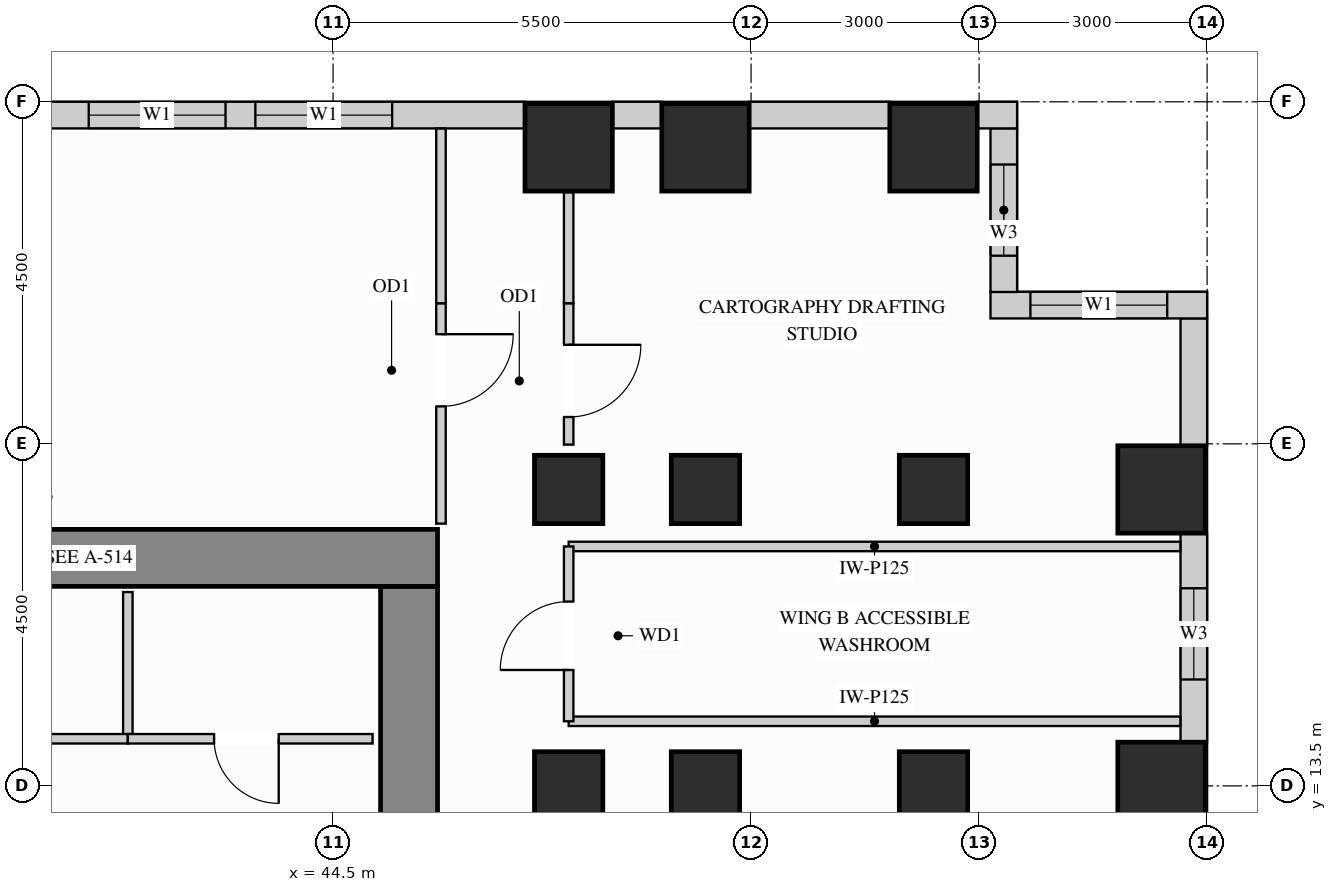
"""IFC4 building model, lengths in metres.
Left out: names, types, materials, properties, quantities, classifications, styles, units other than length and angle.
Written with IfcOpenShell. Run it as: python <this file> out.ifc"""

import sys

from ifc_helpers import new_model, si_unit, direction, frame, frame_2d, origin, origin_2d, place, context, subcontext, project, spatial, rectangle, extrude, source, transform, mapped, element, fill, save


model = new_model("IFC4")
c1 = context("Model", 3, precision=1e-05, world=origin(), true_north=direction((0.0, 1.0)))
c2 = subcontext(c1, "Body", "Model", "MODEL_VIEW")
j1 = project(units=[si_unit("LENGTHUNIT", "METRE"), si_unit("PLANEANGLEUNIT", "RADIAN")], contexts=[c1])
p1 = place(None, origin())
s1 = spatial("IfcSite", under=j1, at=p1, CompositionType="ELEMENT")
p2 = place(p1, origin())
s2 = spatial("IfcBuilding", under=s1, at=p2, CompositionType="ELEMENT")
p3 = place(p2, frame((0.0, 0.0, 109.8)))
s3 = spatial("IfcBuildingStorey", under=s2, at=p3, CompositionType="ELEMENT", Elevation=109.8)
m1 = source(origin(), c2, "Body", "SweptSolid", [
    extrude(rectangle(XDim=0.9, YDim=0.9, at=origin_2d()), origin(), (0.0, 0.0, 1.0), 3.38),
])
for number, where, z_axis, x_axis in (
    (1, (47.6, 13.5, 0.0), (0.0, 0.0, 1.0), (1.0, 0.0, 0.0)),
    (2, (47.6, 17.4, 0.0), (0.0, 0.0, 1.0), (1.0, 0.0, 0.0)),
    (3, (49.4, 13.5, 0.0), (0.0, 0.0, 1.0), (1.0, 0.0, 0.0)),
    (4, (49.4, 17.4, 0.0), (0.0, 0.0, 1.0), (1.0, 0.0, 0.0)),
    (5, (52.4, 13.5, 0.0), (0.0, 0.0, 1.0), (1.0, 0.0, 0.0)),
    (6, (52.4, 17.4, 0.0), (0.0, 0.0, 1.0), (1.0, 0.0, 0.0)),
):
    element("IfcColumn", number, at=place(p3, frame(where, z_axis=z_axis, x_axis=x_axis)), inside=s3, PredefinedType="COLUMN", context=c2, shape_type="MappedRepresentation", body=[
        mapped(m1, transform((0.0, 0.0, 0.0), x_axis=(1.0, 0.0, 0.0), y_axis=(0.0, 1.0, 0.0), z_axis=(0.0, 0.0, 1.0))),
    ])
m2 = source(origin(), c2, "Body", "SweptSolid", [
    extrude(rectangle(XDim=1.15, YDim=1.15, at=origin_2d()), origin(), (0.0, 0.0, 1.0), 3.38),
])
for number, where, z_axis, x_axis in (
    (7, (47.6, 21.9, 0.0), (0.0, 0.0, 1.0), (1.0, 0.0, 0.0)),
    (8, (49.4, 21.9, 0.0), (0.0, 0.0, 1.0), (1.0, 0.0, 0.0)),
    (9, (52.4, 21.9, 0.0), (0.0, 0.0, 1.0), (1.0, 0.0, 0.0)),
    (10, (55.4, 13.5, 0.0), (0.0, 0.0, 1.0), (1.0, 0.0, 0.0)),
    (11, (55.4, 17.4, 0.0), (0.0, 0.0, 1.0), (1.0, 0.0, 0.0)),
):
    element("IfcColumn", number, at=place(p3, frame(where, z_axis=z_axis, x_axis=x_axis)), inside=s3, PredefinedType="COLUMN", context=c2, shape_type="MappedRepresentation", body=[
        mapped(m2, transform((0.0, 0.0, 0.0), x_axis=(1.0, 0.0, 0.0), y_axis=(0.0, 1.0, 0.0), z_axis=(0.0, 0.0, 1.0))),
    ])
m3 = source(origin(), c2, "Body", "SweptSolid", [
    extrude(rectangle(XDim=3.725, YDim=0.75, at=frame_2d((1.863, 0.0))), origin(), (0.0, 0.0, 1.0), 3.38),
])
p4 = place(p3, frame((45.5, 12.4, 0.0), z_axis=(0.0, 0.0, 1.0), x_axis=(0.0, 1.0, 0.0)))
e12 = element("IfcWall", 12, at=p4, inside=s3, PredefinedType="SHEAR", context=c2, shape_type="MappedRepresentation", body=[
    mapped(m3, transform((0.0, 0.0, 0.0), x_axis=(1.0, 0.0, 0.0), y_axis=(0.0, 1.0, 0.0), z_axis=(0.0, 0.0, 1.0))),
])
m4 = source(origin(), c2, "Body", "SweptSolid", [
    extrude(rectangle(XDim=10.25, YDim=0.75, at=frame_2d((5.125, 0.0))), origin(), (0.0, 0.0, 1.0), 3.38),
])
p5 = place(p3, frame((35.625, 16.5, 0.0), z_axis=(0.0, 0.0, 1.0), x_axis=(1.0, 0.0, 0.0)))
e13 = element("IfcWall", 13, at=p5, inside=s3, PredefinedType="SHEAR", context=c2, shape_type="MappedRepresentation", body=[
    mapped(m4, transform((0.0, 0.0, 0.0), x_axis=(1.0, 0.0, 0.0), y_axis=(0.0, 1.0, 0.0), z_axis=(0.0, 0.0, 1.0))),
])
p6 = place(p3, frame((55.825, 14.073, 0.0), z_axis=(0.0, 0.0, 1.0), x_axis=(0.0, 1.0, 0.0)))
e14 = element("IfcWall", 14, at=p6, inside=s3, PredefinedType="SOLIDWALL", context=c2, shape_type="SweptSolid", body=[
    extrude(rectangle(XDim=2.754, YDim=0.35, at=frame_2d((1.377, 0.0))), origin(), (0.0, 0.0, 1.0), 3.365),
])
p7 = place(p6, frame((0.827, 0.0, 0.78)))
e15 = element("IfcOpeningElement", 15, at=p7, cuts=e14, PredefinedType="OPENING", context=c2, shape_type="SweptSolid", body=[
    extrude(rectangle(XDim=1.2, YDim=2.1, at=frame_2d((0.6, 1.05))), frame((0.0, 0.185, 0.0), z_axis=(0.0, -1.0, 0.0), x_axis=(1.0, 0.0, 0.0)), (0.0, 0.0, 1.0), 0.37),
])
m5 = source(origin(), c2, "Body", "SweptSolid", [
    extrude(rectangle(XDim=1.679, YDim=0.35, at=frame_2d((0.84, 0.0))), origin(), (0.0, 0.0, 1.0), 3.365),
])
p8 = place(p3, frame((55.825, 17.973, 0.0), z_axis=(0.0, 0.0, 1.0), x_axis=(0.0, 1.0, 0.0)))
e16 = element("IfcWall", 16, at=p8, inside=s3, PredefinedType="SOLIDWALL", context=c2, shape_type="MappedRepresentation", body=[
    mapped(m5, transform((0.0, 0.0, 0.0), x_axis=(1.0, 0.0, 0.0), y_axis=(0.0, 1.0, 0.0), z_axis=(0.0, 0.0, 1.0))),
])
p9 = place(p3, frame((56.0, 19.825, 0.0), z_axis=(0.0, 0.0, 1.0), x_axis=(-1.0, 0.0, 0.0)))
e17 = element("IfcWall", 17, at=p9, inside=s3, PredefinedType="SOLIDWALL", context=c2, shape_type="SweptSolid", body=[
    extrude(rectangle(XDim=2.85, YDim=0.35, at=frame_2d((1.425, 0.0))), origin(), (0.0, 0.0, 1.0), 3.365),
])
p10 = place(p9, frame((0.525, 0.0, 0.78)))
e18 = element("IfcOpeningElement", 18, at=p10, cuts=e17, PredefinedType="OPENING", context=c2, shape_type="SweptSolid", body=[
    extrude(rectangle(XDim=1.8, YDim=2.1, at=frame_2d((0.9, 1.05))), frame((0.0, 0.185, 0.0), z_axis=(0.0, -1.0, 0.0), x_axis=(1.0, 0.0, 0.0)), (0.0, 0.0, 1.0), 0.37),
])
p11 = place(p3, frame((53.325, 19.998, 0.0), z_axis=(0.0, 0.0, 1.0), x_axis=(0.0, 1.0, 0.0)))
e19 = element("IfcWall", 19, at=p11, inside=s3, PredefinedType="SOLIDWALL", context=c2, shape_type="SweptSolid", body=[
    extrude(rectangle(XDim=2.154, YDim=0.35, at=frame_2d((1.077, 0.0))), origin(), (0.0, 0.0, 1.0), 3.365),
])
p12 = place(p11, frame((0.477, 0.0, 0.78)))
e20 = element("IfcOpeningElement", 20, at=p12, cuts=e19, PredefinedType="OPENING", context=c2, shape_type="SweptSolid", body=[
    extrude(rectangle(XDim=1.2, YDim=2.1, at=frame_2d((0.6, 1.05))), frame((0.0, 0.185, 0.0), z_axis=(0.0, -1.0, 0.0), x_axis=(1.0, 0.0, 0.0)), (0.0, 0.0, 1.0), 0.37),
])
m6 = source(origin(), c2, "Body", "SweptSolid", [
    extrude(rectangle(XDim=0.527, YDim=0.35, at=frame_2d((0.264, 0.0))), origin(), (0.0, 0.0, 1.0), 3.365),
])
p13 = place(p3, frame((53.5, 22.325, 0.0), z_axis=(0.0, 0.0, 1.0), x_axis=(-1.0, 0.0, 0.0)))
e21 = element("IfcWall", 21, at=p13, inside=s3, PredefinedType="SOLIDWALL", context=c2, shape_type="MappedRepresentation", body=[
    mapped(m6, transform((0.0, 0.0, 0.0), x_axis=(1.0, 0.0, 0.0), y_axis=(0.0, 1.0, 0.0), z_axis=(0.0, 0.0, 1.0))),
])
m7 = source(origin(), c2, "Body", "SweptSolid", [
    extrude(rectangle(XDim=1.854, YDim=0.35, at=frame_2d((0.927, 0.0))), origin(), (0.0, 0.0, 1.0), 3.365),
])
p14 = place(p3, frame((51.827, 22.325, 0.0), z_axis=(0.0, 0.0, 1.0), x_axis=(-1.0, 0.0, 0.0)))
e22 = element("IfcWall", 22, at=p14, inside=s3, PredefinedType="SOLIDWALL", context=c2, shape_type="MappedRepresentation", body=[
    mapped(m7, transform((0.0, 0.0, 0.0), x_axis=(1.0, 0.0, 0.0), y_axis=(0.0, 1.0, 0.0), z_axis=(0.0, 0.0, 1.0))),
])
m8 = source(origin(), c2, "Body", "SweptSolid", [
    extrude(rectangle(XDim=0.654, YDim=0.35, at=frame_2d((0.327, 0.0))), origin(), (0.0, 0.0, 1.0), 3.365),
])
p15 = place(p3, frame((48.827, 22.325, 0.0), z_axis=(0.0, 0.0, 1.0), x_axis=(-1.0, 0.0, 0.0)))
e23 = element("IfcWall", 23, at=p15, inside=s3, PredefinedType="SOLIDWALL", context=c2, shape_type="MappedRepresentation", body=[
    mapped(m8, transform((0.0, 0.0, 0.0), x_axis=(1.0, 0.0, 0.0), y_axis=(0.0, 1.0, 0.0), z_axis=(0.0, 0.0, 1.0))),
])
p16 = place(p3, frame((47.027, 22.325, 0.0), z_axis=(0.0, 0.0, 1.0), x_axis=(-1.0, 0.0, 0.0)))
e24 = element("IfcWall", 24, at=p16, inside=s3, PredefinedType="SOLIDWALL", context=c2, shape_type="SweptSolid", body=[
    extrude(rectangle(XDim=6.454, YDim=0.35, at=frame_2d((3.227, 0.0))), origin(), (0.0, 0.0, 1.0), 3.365),
])
p17 = place(p16, frame((1.749, 0.0, 0.78)))
e25 = element("IfcOpeningElement", 25, at=p17, cuts=e24, PredefinedType="OPENING", context=c2, shape_type="SweptSolid", body=[
    extrude(rectangle(XDim=1.8, YDim=2.1, at=frame_2d((0.9, 1.05))), frame((0.0, 0.185, 0.0), z_axis=(0.0, -1.0, 0.0), x_axis=(1.0, 0.0, 0.0)), (0.0, 0.0, 1.0), 0.37),
])
p18 = place(p16, frame((3.942, 0.0, 0.78)))
e26 = element("IfcOpeningElement", 26, at=p18, cuts=e24, PredefinedType="OPENING", context=c2, shape_type="SweptSolid", body=[
    extrude(rectangle(XDim=1.8, YDim=2.1, at=frame_2d((0.9, 1.05))), frame((0.0, 0.185, 0.0), z_axis=(0.0, -1.0, 0.0), x_axis=(1.0, 0.0, 0.0)), (0.0, 0.0, 1.0), 0.37),
])
m9 = source(origin(), c2, "Body", "SweptSolid", [
    extrude(rectangle(XDim=1.93, YDim=0.125, at=frame_2d((0.965, 0.0))), origin(), (0.0, 0.0, 1.0), 3.365),
])
p19 = place(p3, frame((41.8, 14.12, 0.0), z_axis=(0.0, 0.0, 1.0), x_axis=(0.0, 1.0, 0.0)))
e27 = element("IfcWall", 27, at=p19, inside=s3, PredefinedType="PARTITIONING", context=c2, shape_type="MappedRepresentation", body=[
    mapped(m9, transform((0.0, 0.0, 0.0), x_axis=(1.0, 0.0, 0.0), y_axis=(0.0, 1.0, 0.0), z_axis=(0.0, 0.0, 1.0))),
])
p20 = place(p3, frame((36.5, 14.12, 0.0), z_axis=(0.0, 0.0, 1.0), x_axis=(1.0, 0.0, 0.0)))
e28 = element("IfcWall", 28, at=p20, inside=s3, PredefinedType="PARTITIONING", context=c2, shape_type="SweptSolid", body=[
    extrude(rectangle(XDim=5.3, YDim=0.125, at=frame_2d((2.65, 0.0))), origin(), (0.0, 0.0, 1.0), 3.365),
])
p21 = place(p20, frame((2.175, 0.0, 0.0)))
e29 = element("IfcOpeningElement", 29, at=p21, cuts=e28, PredefinedType="OPENING", context=c2, shape_type="SweptSolid", body=[
    extrude(rectangle(XDim=0.95, YDim=2.15, at=frame_2d((0.475, 1.075))), frame((0.0, 0.073, 0.0), z_axis=(0.0, -1.0, 0.0), x_axis=(1.0, 0.0, 0.0)), (0.0, 0.0, 1.0), 0.145),
])
p22 = place(p3, frame((41.8, 14.12, 0.0), z_axis=(0.0, 0.0, 1.0), x_axis=(1.0, 0.0, 0.0)))
e30 = element("IfcWall", 30, at=p22, inside=s3, PredefinedType="PARTITIONING", context=c2, shape_type="SweptSolid", body=[
    extrude(rectangle(XDim=3.22, YDim=0.125, at=frame_2d((1.61, 0.0))), origin(), (0.0, 0.0, 1.0), 3.365),
])
p23 = place(p22, frame((1.135, 0.0, 0.0)))
e31 = element("IfcOpeningElement", 31, at=p23, cuts=e30, PredefinedType="OPENING", context=c2, shape_type="SweptSolid", body=[
    extrude(rectangle(XDim=0.85, YDim=2.1, at=frame_2d((0.425, 1.05))), frame((0.0, 0.073, 0.0), z_axis=(0.0, -1.0, 0.0), x_axis=(1.0, 0.0, 0.0)), (0.0, 0.0, 1.0), 0.145),
])
m10 = source(origin(), c2, "Body", "SweptSolid", [
    extrude(rectangle(XDim=8.048, YDim=0.125, at=frame_2d((4.024, 0.0))), origin(), (0.0, 0.0, 1.0), 3.365),
])
p24 = place(p3, frame((47.6, 14.35, 0.0), z_axis=(0.0, 0.0, 1.0), x_axis=(1.0, 0.0, 0.0)))
e32 = element("IfcWall", 32, at=p24, inside=s3, PredefinedType="PARTITIONING", context=c2, shape_type="MappedRepresentation", body=[
    mapped(m10, transform((0.0, 0.0, 0.0), x_axis=(1.0, 0.0, 0.0), y_axis=(0.0, 1.0, 0.0), z_axis=(0.0, 0.0, 1.0))),
])
m11 = source(origin(), c2, "Body", "SweptSolid", [
    extrude(rectangle(XDim=8.048, YDim=0.125, at=frame_2d((4.024, 0.0))), origin(), (0.0, 0.0, 1.0), 2.677),
])
p25 = place(p3, frame((47.6, 16.65, 0.0), z_axis=(0.0, 0.0, 1.0), x_axis=(1.0, 0.0, 0.0)))
e33 = element("IfcWall", 33, at=p25, inside=s3, PredefinedType="PARTITIONING", context=c2, shape_type="MappedRepresentation", body=[
    mapped(m11, transform((0.0, 0.0, 0.0), x_axis=(1.0, 0.0, 0.0), y_axis=(0.0, 1.0, 0.0), z_axis=(0.0, 0.0, 1.0))),
])
p26 = place(p3, frame((47.6, 17.99, 0.0), z_axis=(0.0, 0.0, 1.0), x_axis=(0.0, 1.0, 0.0)))
e34 = element("IfcWall", 34, at=p26, inside=s3, PredefinedType="PARTITIONING", context=c2, shape_type="SweptSolid", body=[
    extrude(rectangle(XDim=1.86, YDim=0.125, at=frame_2d((0.93, 0.0))), origin(), (0.0, 0.0, 1.0), 2.677),
])
p27 = place(p26, frame((0.363, 0.0, 0.0)))
e35 = element("IfcOpeningElement", 35, at=p27, cuts=e34, PredefinedType="OPENING", context=c2, shape_type="SweptSolid", body=[
    extrude(rectangle(XDim=0.95, YDim=2.15, at=frame_2d((0.475, 1.075))), frame((0.0, 0.073, 0.0), z_axis=(0.0, -1.0, 0.0), x_axis=(1.0, 0.0, 0.0)), (0.0, 0.0, 1.0), 0.145),
])
m12 = source(origin(), c2, "Body", "SweptSolid", [
    extrude(rectangle(XDim=1.46, YDim=0.125, at=frame_2d((0.73, 0.0))), origin(), (0.0, 0.0, 1.0), 2.677),
])
p28 = place(p3, frame((47.6, 19.85, 0.0), z_axis=(0.0, 0.0, 1.0), x_axis=(0.0, 1.0, 0.0)))
e36 = element("IfcWall", 36, at=p28, inside=s3, PredefinedType="PARTITIONING", context=c2, shape_type="MappedRepresentation", body=[
    mapped(m12, transform((0.0, 0.0, 0.0), x_axis=(1.0, 0.0, 0.0), y_axis=(0.0, 1.0, 0.0), z_axis=(0.0, 0.0, 1.0))),
])
p29 = place(p3, frame((47.6, 14.35, 0.0), z_axis=(0.0, 0.0, 1.0), x_axis=(0.0, 1.0, 0.0)))
e37 = element("IfcWall", 37, at=p29, inside=s3, PredefinedType="PARTITIONING", context=c2, shape_type="SweptSolid", body=[
    extrude(rectangle(XDim=2.3, YDim=0.125, at=frame_2d((1.15, 0.0))), origin(), (0.0, 0.0, 1.0), 2.677),
])
p30 = place(p29, frame((0.675, 0.0, 0.0)))
e38 = element("IfcOpeningElement", 38, at=p30, cuts=e37, PredefinedType="OPENING", context=c2, shape_type="SweptSolid", body=[
    extrude(rectangle(XDim=0.9, YDim=2.15, at=frame_2d((0.45, 1.075))), frame((0.0, 0.073, 0.0), z_axis=(0.0, -1.0, 0.0), x_axis=(1.0, 0.0, 0.0)), (0.0, 0.0, 1.0), 0.145),
])
p31 = place(p3, frame((45.92, 16.95, 0.0), z_axis=(0.0, 0.0, 1.0), x_axis=(0.0, 1.0, 0.0)))
e39 = element("IfcWall", 39, at=p31, inside=s3, PredefinedType="PARTITIONING", context=c2, shape_type="SweptSolid", body=[
    extrude(rectangle(XDim=2.9, YDim=0.125, at=frame_2d((1.45, 0.0))), origin(), (0.0, 0.0, 1.0), 3.365),
])
p32 = place(p31, frame((1.543, 0.0, 0.0)))
e40 = element("IfcOpeningElement", 40, at=p32, cuts=e39, PredefinedType="OPENING", context=c2, shape_type="SweptSolid", body=[
    extrude(rectangle(XDim=0.95, YDim=2.15, at=frame_2d((0.475, 1.075))), frame((0.0, 0.073, 0.0), z_axis=(0.0, -1.0, 0.0), x_axis=(1.0, 0.0, 0.0)), (0.0, 0.0, 1.0), 0.145),
])
m13 = source(origin(), c2, "Body", "SweptSolid", [
    extrude(rectangle(XDim=2.298, YDim=0.125, at=frame_2d((1.149, 0.0))), origin(), (0.0, 0.0, 1.0), 3.365),
])
p33 = place(p3, frame((45.92, 19.85, 0.0), z_axis=(0.0, 0.0, 1.0), x_axis=(0.0, 1.0, 0.0)))
e41 = element("IfcWall", 41, at=p33, inside=s3, PredefinedType="PARTITIONING", context=c2, shape_type="MappedRepresentation", body=[
    mapped(m13, transform((0.0, 0.0, 0.0), x_axis=(1.0, 0.0, 0.0), y_axis=(0.0, 1.0, 0.0), z_axis=(0.0, 0.0, 1.0))),
])
m14 = source(origin(), c2, "Body", "SweptSolid", [
    extrude(rectangle(XDim=0.95, YDim=2.15, at=frame_2d((0.475, 1.075))), frame((0.0, 0.025, 0.0), z_axis=(0.0, -1.0, 0.0), x_axis=(1.0, 0.0, 0.0)), (0.0, 0.0, 1.0), 0.05),
])
p34 = place(p32, origin())
e42 = element("IfcDoor", 42, at=p34, inside=s3, OperationType="SINGLE_SWING_RIGHT", PredefinedType="DOOR", context=c2, shape_type="MappedRepresentation", body=[
    mapped(m14, transform((0.0, 0.0, 0.0), x_axis=(1.0, 0.0, 0.0), y_axis=(0.0, 1.0, 0.0), z_axis=(0.0, 0.0, 1.0))),
])
fill(e40, e42)
p35 = place(p27, origin())
e43 = element("IfcDoor", 43, at=p35, inside=s3, OperationType="SINGLE_SWING_RIGHT", PredefinedType="DOOR", context=c2, shape_type="MappedRepresentation", body=[
    mapped(m14, transform((0.0, 0.0, 0.0), x_axis=(1.0, 0.0, 0.0), y_axis=(0.0, 1.0, 0.0), z_axis=(0.0, 0.0, 1.0))),
])
fill(e35, e43)
m15 = source(origin(), c2, "Body", "SweptSolid", [
    extrude(rectangle(XDim=0.85, YDim=2.1, at=frame_2d((0.425, 1.05))), frame((0.0, 0.025, 0.0), z_axis=(0.0, -1.0, 0.0), x_axis=(1.0, 0.0, 0.0)), (0.0, 0.0, 1.0), 0.05),
])
p36 = place(p23, origin())
e44 = element("IfcDoor", 44, at=p36, inside=s3, OperationType="SINGLE_SWING_RIGHT", PredefinedType="DOOR", context=c2, shape_type="MappedRepresentation", body=[
    mapped(m15, transform((0.0, 0.0, 0.0), x_axis=(1.0, 0.0, 0.0), y_axis=(0.0, 1.0, 0.0), z_axis=(0.0, 0.0, 1.0))),
])
fill(e31, e44)
m16 = source(origin(), c2, "Body", "SweptSolid", [
    extrude(rectangle(XDim=0.9, YDim=2.15, at=frame_2d((0.45, 1.075))), frame((0.0, 0.025, 0.0), z_axis=(0.0, -1.0, 0.0), x_axis=(1.0, 0.0, 0.0)), (0.0, 0.0, 1.0), 0.05),
])
p37 = place(p30, origin())
e45 = element("IfcDoor", 45, at=p37, inside=s3, OperationType="SINGLE_SWING_LEFT", PredefinedType="DOOR", context=c2, shape_type="MappedRepresentation", body=[
    mapped(m16, transform((0.0, 0.0, 0.0), x_axis=(1.0, 0.0, 0.0), y_axis=(0.0, 1.0, 0.0), z_axis=(0.0, 0.0, 1.0))),
])
fill(e38, e45)
m17 = source(origin(), c2, "Body", "SweptSolid", [
    extrude(rectangle(XDim=1.8, YDim=2.1, at=frame_2d((0.9, 1.05))), frame((0.0, 0.03, 0.0), z_axis=(0.0, -1.0, 0.0), x_axis=(1.0, 0.0, 0.0)), (0.0, 0.0, 1.0), 0.06),
])
p38 = place(p10, origin())
e46 = element("IfcWindow", 46, at=p38, inside=s3, PartitioningType="SINGLE_PANEL", PredefinedType="WINDOW", context=c2, shape_type="MappedRepresentation", body=[
    mapped(m17, transform((0.0, 0.0, 0.0), x_axis=(1.0, 0.0, 0.0), y_axis=(0.0, 1.0, 0.0), z_axis=(0.0, 0.0, 1.0))),
])
fill(e18, e46)
p39 = place(p17, origin())
e47 = element("IfcWindow", 47, at=p39, inside=s3, PartitioningType="SINGLE_PANEL", PredefinedType="WINDOW", context=c2, shape_type="MappedRepresentation", body=[
    mapped(m17, transform((0.0, 0.0, 0.0), x_axis=(1.0, 0.0, 0.0), y_axis=(0.0, 1.0, 0.0), z_axis=(0.0, 0.0, 1.0))),
])
fill(e25, e47)
p40 = place(p18, origin())
e48 = element("IfcWindow", 48, at=p40, inside=s3, PartitioningType="SINGLE_PANEL", PredefinedType="WINDOW", context=c2, shape_type="MappedRepresentation", body=[
    mapped(m17, transform((0.0, 0.0, 0.0), x_axis=(1.0, 0.0, 0.0), y_axis=(0.0, 1.0, 0.0), z_axis=(0.0, 0.0, 1.0))),
])
fill(e26, e48)
m18 = source(origin(), c2, "Body", "SweptSolid", [
    extrude(rectangle(XDim=1.2, YDim=2.1, at=frame_2d((0.6, 1.05))), frame((0.0, 0.03, 0.0), z_axis=(0.0, -1.0, 0.0), x_axis=(1.0, 0.0, 0.0)), (0.0, 0.0, 1.0), 0.06),
])
p41 = place(p7, origin())
e49 = element("IfcWindow", 49, at=p41, inside=s3, PartitioningType="SINGLE_PANEL", PredefinedType="WINDOW", context=c2, shape_type="MappedRepresentation", body=[
    mapped(m18, transform((0.0, 0.0, 0.0), x_axis=(1.0, 0.0, 0.0), y_axis=(0.0, 1.0, 0.0), z_axis=(0.0, 0.0, 1.0))),
])
fill(e15, e49)
p42 = place(p12, origin())
e50 = element("IfcWindow", 50, at=p42, inside=s3, PartitioningType="SINGLE_PANEL", PredefinedType="WINDOW", context=c2, shape_type="MappedRepresentation", body=[
    mapped(m18, transform((0.0, 0.0, 0.0), x_axis=(1.0, 0.0, 0.0), y_axis=(0.0, 1.0, 0.0), z_axis=(0.0, 0.0, 1.0))),
])
fill(e20, e50)
save(model, sys.argv[1])
